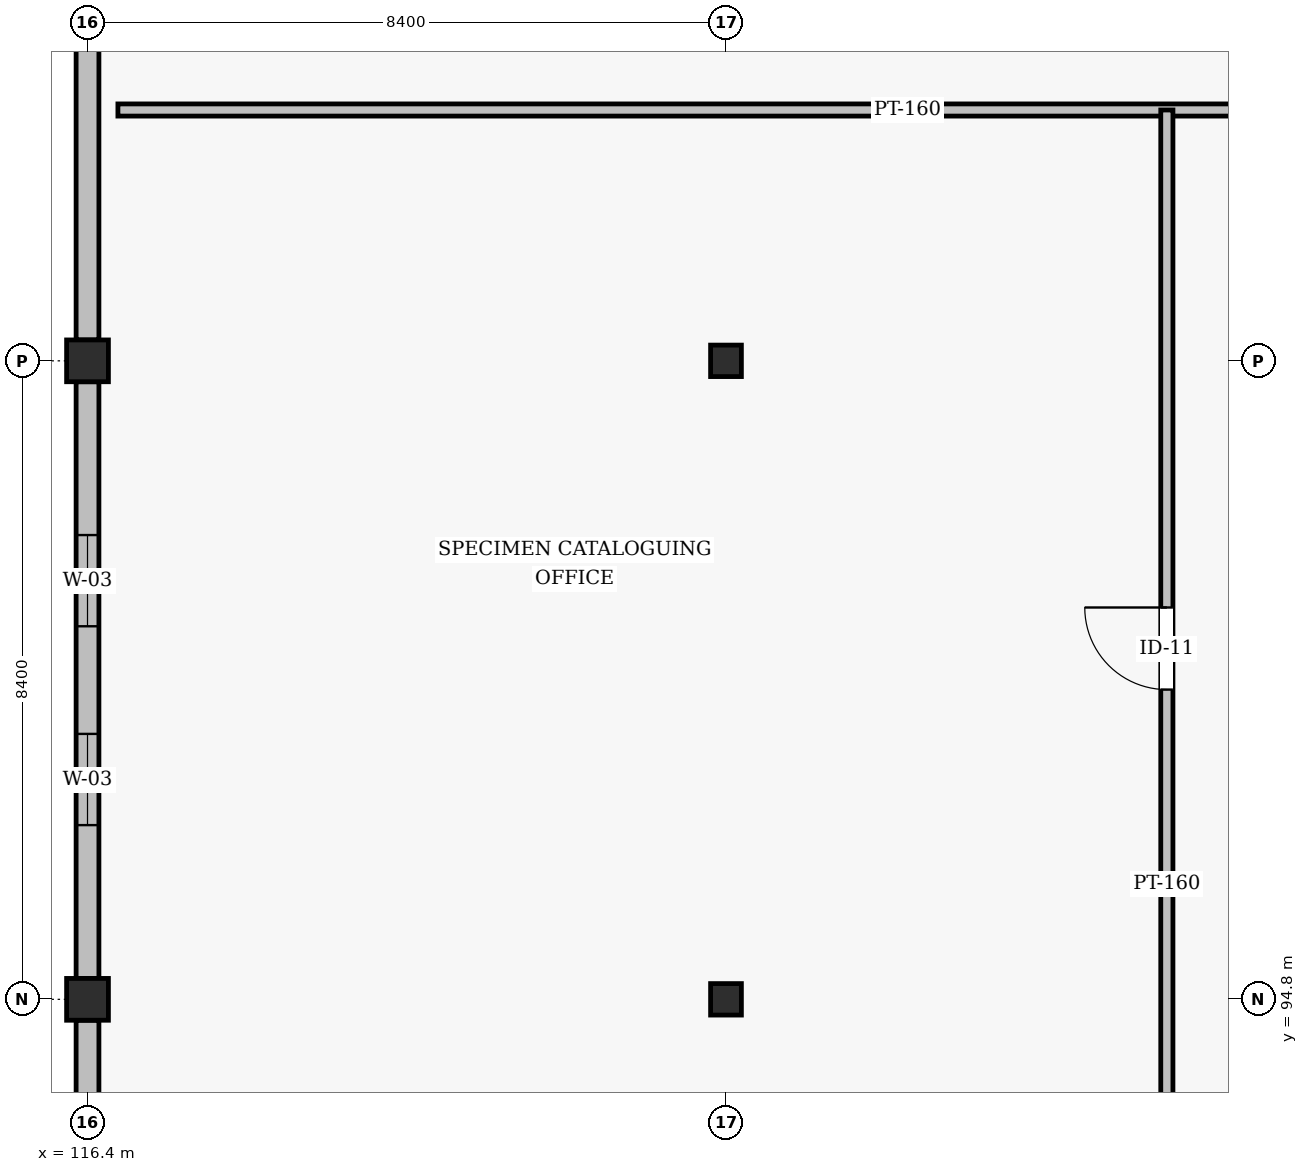
"""IFC4 building model, lengths in metres.
Left out: names, types, materials, properties, quantities, classifications, styles, units other than length and angle.
Written with IfcOpenShell. Run it as: python <this file> out.ifc"""

import sys

from ifc_helpers import new_model, si_unit, direction, frame, frame_2d, origin, origin_2d, place, context, subcontext, project, spatial, rectangle, hollow_rectangle, i_section, extrude, element, fill, save


model = new_model("IFC4")
c1 = context("Model", 3, precision=1e-05, world=origin(), true_north=direction((0.0, 1.0)))
c2 = subcontext(c1, "Body", "Model", "MODEL_VIEW")
j1 = project(units=[si_unit("LENGTHUNIT", "METRE"), si_unit("PLANEANGLEUNIT", "RADIAN")], contexts=[c1])
p1 = place(None, origin())
s1 = spatial("IfcSite", under=j1, at=p1, CompositionType="ELEMENT")
p2 = place(p1, origin())
s2 = spatial("IfcBuilding", under=s1, at=p2, CompositionType="ELEMENT")
p3 = place(p2, frame((0.0, 0.0, 13.2)))
s3 = spatial("IfcBuildingStorey", under=s2, at=p3, CompositionType="ELEMENT", Elevation=13.2)
for number, where, z_axis, x_axis in (
    (1, (116.4, 94.8, 0.0), (0.0, 0.0, 1.0), (1.0, 0.0, 0.0)),
    (2, (116.4, 103.2, 0.0), (0.0, 0.0, 1.0), (1.0, 0.0, 0.0)),
):
    element("IfcColumn", number, at=place(p3, frame(where, z_axis=z_axis, x_axis=x_axis)), inside=s3, PredefinedType="COLUMN", context=c2, shape_type="SweptSolid", body=[
        extrude(hollow_rectangle(XDim=0.55, YDim=0.55, WallThickness=0.022, InnerFilletRadius=0.022, OuterFilletRadius=0.044, at=origin_2d()), origin(), (0.0, 0.0, 1.0), 3.9),
    ])
for number, where, z_axis, x_axis in (
    (3, (124.8, 94.8, 0.0), (0.0, 0.0, 1.0), (1.0, 0.0, 0.0)),
    (4, (124.8, 103.2, 0.0), (0.0, 0.0, 1.0), (1.0, 0.0, 0.0)),
):
    element("IfcColumn", number, at=place(p3, frame(where, z_axis=z_axis, x_axis=x_axis)), inside=s3, PredefinedType="COLUMN", context=c2, shape_type="SweptSolid", body=[
        extrude(i_section(OverallWidth=0.405, OverallDepth=0.414, WebThickness=0.018, FlangeThickness=0.028, FilletRadius=0.022, at=origin_2d()), origin(), (0.0, 0.0, 1.0), 3.9),
    ])
p4 = place(p3, frame((116.4, 114.925, 0.0), z_axis=(0.0, 0.0, 1.0), x_axis=(0.0, -1.0, 0.0)))
e5 = element("IfcWall", 5, at=p4, inside=s3, PredefinedType="SOLIDWALL", context=c2, shape_type="SweptSolid", body=[
    extrude(rectangle(XDim=11.45, YDim=0.3, at=frame_2d((5.725, 0.0))), origin(), (0.0, 0.0, 1.0), 2.828),
])
p5 = place(p3, frame((116.4, 102.925, 0.0), z_axis=(0.0, 0.0, 1.0), x_axis=(0.0, -1.0, 0.0)))
e6 = element("IfcWall", 6, at=p5, inside=s3, PredefinedType="SOLIDWALL", context=c2, shape_type="SweptSolid", body=[
    extrude(rectangle(XDim=7.85, YDim=0.3, at=frame_2d((3.925, 0.0))), origin(), (0.0, 0.0, 1.0), 3.12),
])
p6 = place(p5, frame((2.017, 0.0, 0.85)))
e7 = element("IfcOpeningElement", 7, at=p6, cuts=e6, PredefinedType="OPENING", context=c2, shape_type="SweptSolid", body=[
    extrude(rectangle(XDim=1.2, YDim=1.97, at=frame_2d((0.6, 0.985))), frame((0.0, 0.16, 0.0), z_axis=(0.0, -1.0, 0.0), x_axis=(1.0, 0.0, 0.0)), (0.0, 0.0, 1.0), 0.32),
])
p7 = place(p5, frame((4.633, 0.0, 0.85)))
e8 = element("IfcOpeningElement", 8, at=p7, cuts=e6, PredefinedType="OPENING", context=c2, shape_type="SweptSolid", body=[
    extrude(rectangle(XDim=1.2, YDim=1.97, at=frame_2d((0.6, 0.985))), frame((0.0, 0.16, 0.0), z_axis=(0.0, -1.0, 0.0), x_axis=(1.0, 0.0, 0.0)), (0.0, 0.0, 1.0), 0.32),
])
p8 = place(p3, frame((116.4, 94.525, 0.0), z_axis=(0.0, 0.0, 1.0), x_axis=(0.0, -1.0, 0.0)))
e9 = element("IfcWall", 9, at=p8, inside=s3, PredefinedType="SOLIDWALL", context=c2, shape_type="SweptSolid", body=[
    extrude(rectangle(XDim=7.85, YDim=0.3, at=frame_2d((3.925, 0.0))), origin(), (0.0, 0.0, 1.0), 3.12),
])
p9 = place(p8, frame((2.192, 0.0, 1.1)))
e10 = element("IfcOpeningElement", 10, at=p9, cuts=e9, PredefinedType="OPENING", context=c2, shape_type="SweptSolid", body=[
    extrude(rectangle(XDim=0.85, YDim=1.45, at=frame_2d((0.425, 0.725))), frame((0.0, 0.16, 0.0), z_axis=(0.0, -1.0, 0.0), x_axis=(1.0, 0.0, 0.0)), (0.0, 0.0, 1.0), 0.32),
])
p10 = place(p8, frame((4.808, 0.0, 1.1)))
e11 = element("IfcOpeningElement", 11, at=p10, cuts=e9, PredefinedType="OPENING", context=c2, shape_type="SweptSolid", body=[
    extrude(rectangle(XDim=0.85, YDim=1.45, at=frame_2d((0.425, 0.725))), frame((0.0, 0.16, 0.0), z_axis=(0.0, -1.0, 0.0), x_axis=(1.0, 0.0, 0.0)), (0.0, 0.0, 1.0), 0.32),
])
p11 = place(p3, frame((116.8, 106.5, 0.0), z_axis=(0.0, 0.0, 1.0), x_axis=(1.0, 0.0, 0.0)))
e12 = element("IfcWall", 12, at=p11, inside=s3, PredefinedType="PARTITIONING", context=c2, shape_type="SweptSolid", body=[
    extrude(rectangle(XDim=37.1, YDim=0.16, at=frame_2d((18.55, 0.0))), origin(), (0.0, 0.0, 1.0), 2.92),
])
p12 = place(p11, frame((17.75, 0.0, 0.0)))
e13 = element("IfcOpeningElement", 13, at=p12, cuts=e12, PredefinedType="OPENING", context=c2, shape_type="SweptSolid", body=[
    extrude(rectangle(XDim=1.6, YDim=2.1, at=frame_2d((0.8, 1.05))), frame((0.0, 0.09, 0.0), z_axis=(0.0, -1.0, 0.0), x_axis=(1.0, 0.0, 0.0)), (0.0, 0.0, 1.0), 0.18),
])
p13 = place(p3, frame((130.6, 92.35, 0.0), z_axis=(0.0, 0.0, 1.0), x_axis=(0.0, 1.0, 0.0)))
e14 = element("IfcWall", 14, at=p13, inside=s3, PredefinedType="PARTITIONING", context=c2, shape_type="SweptSolid", body=[
    extrude(rectangle(XDim=14.15, YDim=0.16, at=frame_2d((7.075, 0.0))), origin(), (0.0, 0.0, 1.0), 3.07),
])
p14 = place(p13, frame((6.525, 0.0, 0.0)))
e15 = element("IfcOpeningElement", 15, at=p14, cuts=e14, PredefinedType="OPENING", context=c2, shape_type="SweptSolid", body=[
    extrude(rectangle(XDim=1.08, YDim=2.08, at=frame_2d((0.54, 1.04))), frame((0.0, 0.09, 0.0), z_axis=(0.0, -1.0, 0.0), x_axis=(1.0, 0.0, 0.0)), (0.0, 0.0, 1.0), 0.18),
])
p15 = place(p6, origin())
e16 = element("IfcWindow", 16, at=p15, inside=s3, PartitioningType="SINGLE_PANEL", PredefinedType="WINDOW", context=c2, shape_type="SweptSolid", body=[
    extrude(rectangle(XDim=1.2, YDim=1.97, at=frame_2d((0.6, 0.985))), frame((0.0, 0.03, 0.0), z_axis=(0.0, -1.0, 0.0), x_axis=(1.0, 0.0, 0.0)), (0.0, 0.0, 1.0), 0.06),
])
fill(e7, e16)
p16 = place(p7, origin())
e17 = element("IfcWindow", 17, at=p16, inside=s3, PartitioningType="SINGLE_PANEL", PredefinedType="WINDOW", context=c2, shape_type="SweptSolid", body=[
    extrude(rectangle(XDim=1.2, YDim=1.97, at=frame_2d((0.6, 0.985))), frame((0.0, 0.03, 0.0), z_axis=(0.0, -1.0, 0.0), x_axis=(1.0, 0.0, 0.0)), (0.0, 0.0, 1.0), 0.06),
])
fill(e8, e17)
p17 = place(p14, origin())
e18 = element("IfcDoor", 18, at=p17, inside=s3, OperationType="SINGLE_SWING_RIGHT", PredefinedType="DOOR", context=c2, shape_type="SweptSolid", body=[
    extrude(rectangle(XDim=1.08, YDim=2.08, at=frame_2d((0.54, 1.04))), frame((0.0, 0.025, 0.0), z_axis=(0.0, -1.0, 0.0), x_axis=(1.0, 0.0, 0.0)), (0.0, 0.0, 1.0), 0.05),
])
fill(e15, e18)
save(model, sys.argv[1])
